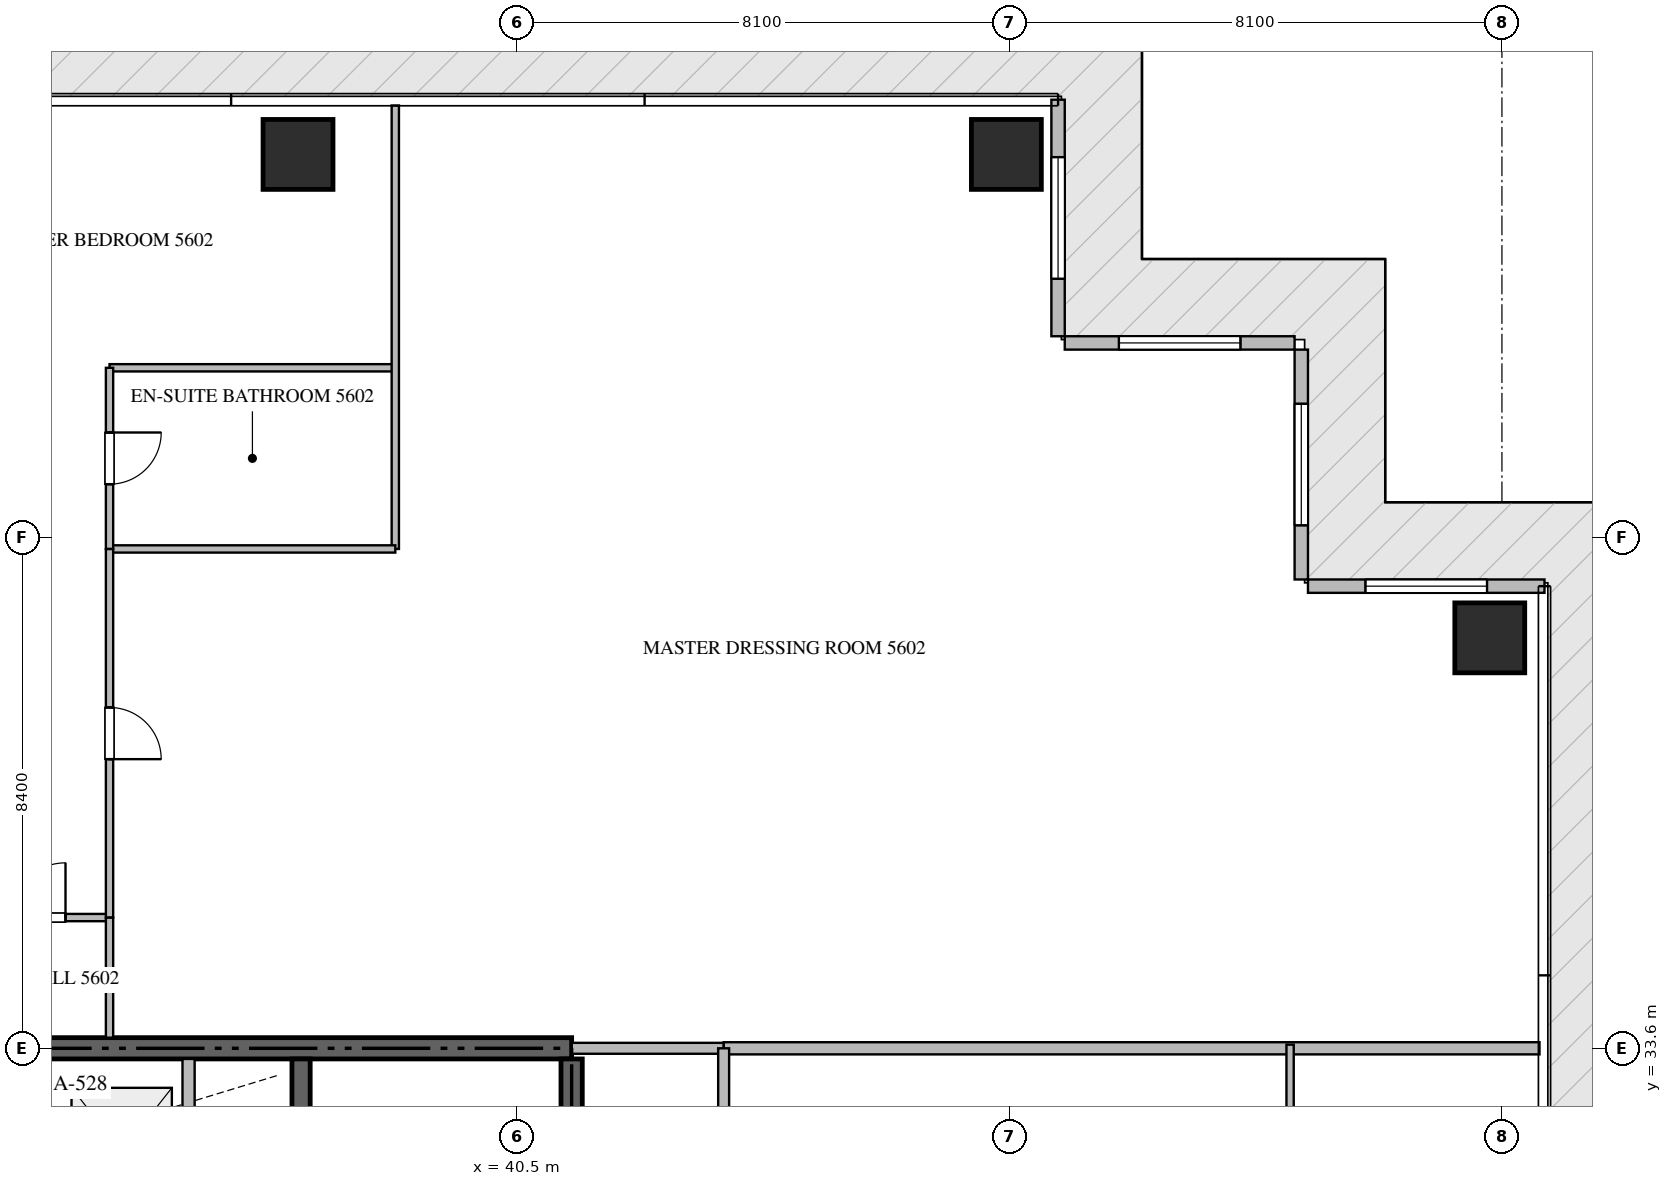
"""IFC4 building model, lengths in metres.
Left out: names, types, materials, properties, quantities, classifications, styles, units other than length and angle.
Written with IfcOpenShell. Run it as: python <this file> out.ifc"""

import sys

from ifc_helpers import new_model, si_unit, direction, frame, frame_2d, origin, origin_2d, place, context, subcontext, project, spatial, rectangle, extrude, source, transform, mapped, element, fill, save


model = new_model("IFC4")
c1 = context("Model", 3, precision=1e-05, world=origin(), true_north=direction((0.0, 1.0)))
c2 = subcontext(c1, "Body", "Model", "MODEL_VIEW")
j1 = project(units=[si_unit("LENGTHUNIT", "METRE"), si_unit("PLANEANGLEUNIT", "RADIAN")], contexts=[c1])
p1 = place(None, origin())
s1 = spatial("IfcSite", under=j1, at=p1, CompositionType="ELEMENT")
p2 = place(p1, origin())
s2 = spatial("IfcBuilding", under=s1, at=p2, CompositionType="ELEMENT")
p3 = place(p2, frame((0.0, 0.0, 225.85)))
s3 = spatial("IfcBuildingStorey", under=s2, at=p3, CompositionType="ELEMENT", Elevation=225.85)
p4 = place(p3, frame((41.4, 33.6, -0.26), z_axis=(0.0, 0.0, 1.0), x_axis=(-1.0, 0.0, 0.0)))
e1 = element("IfcWall", 1, at=p4, inside=s3, PredefinedType="SHEAR", context=c2, shape_type="SweptSolid", body=[
    extrude(rectangle(XDim=18.0, YDim=0.35, at=frame_2d((9.0, 0.0))), origin(), (0.0, 0.0, 1.0), 3.848),
])
p5 = place(p3, frame((41.4, 27.75, -0.26), z_axis=(0.0, 0.0, 1.0), x_axis=(0.0, 1.0, 0.0)))
e2 = element("IfcWall", 2, at=p5, inside=s3, PredefinedType="SHEAR", context=c2, shape_type="SweptSolid", body=[
    extrude(rectangle(XDim=5.675, YDim=0.35, at=frame_2d((2.837, 0.0))), origin(), (0.0, 0.0, 1.0), 3.848),
])
p6 = place(p3, frame((36.95, 27.05, -0.26), z_axis=(0.0, 0.0, 1.0), x_axis=(0.0, 1.0, 0.0)))
e3 = element("IfcWall", 3, at=p6, inside=s3, PredefinedType="SHEAR", context=c2, shape_type="SweptSolid", body=[
    extrude(rectangle(XDim=6.375, YDim=0.3, at=frame_2d((3.188, 0.0))), origin(), (0.0, 0.0, 1.0), 3.848),
])
m1 = source(origin(), c2, "Body", "SweptSolid", [
    extrude(rectangle(XDim=1.15, YDim=1.15, at=origin_2d()), origin(), (0.0, 0.0, 1.0), 3.85),
])
for number, where, z_axis, x_axis in (
    (4, (36.9, 48.3, -0.26), (0.0, 0.0, 1.0), (1.0, 0.0, 0.0)),
    (5, (48.55, 48.3, -0.26), (0.0, 0.0, 1.0), (1.0, 0.0, 0.0)),
    (6, (56.5, 40.35, -0.26), (0.0, 0.0, 1.0), (1.0, 0.0, 0.0)),
):
    element("IfcColumn", number, at=place(p3, frame(where, z_axis=z_axis, x_axis=x_axis)), inside=s3, PredefinedType="COLUMN", context=c2, shape_type="MappedRepresentation", body=[
        mapped(m1, transform((0.0, 0.0, 0.0), scale=1.0)),
    ])
p7 = place(p3, frame((57.4, 41.2, 0.0), z_axis=(0.0, 0.0, 1.0), x_axis=(-1.0, 0.0, 0.0)))
e7 = element("IfcWall", 7, at=p7, inside=s3, PredefinedType="ELEMENTEDWALL", context=c2, shape_type="SweptSolid", body=[
    extrude(rectangle(XDim=3.89, YDim=0.22, at=frame_2d((1.945, 0.0))), origin(), (0.0, 0.0, 1.0), 3.575),
])
p8 = place(p7, frame((0.945, 0.0, 0.65)))
e8 = element("IfcOpeningElement", 8, at=p8, cuts=e7, PredefinedType="OPENING", context=c2, shape_type="SweptSolid", body=[
    extrude(rectangle(XDim=2.0, YDim=2.2, at=frame_2d((1.0, 1.1))), frame((0.0, 0.12, 0.0), z_axis=(0.0, -1.0, 0.0), x_axis=(1.0, 0.0, 0.0)), (0.0, 0.0, 1.0), 0.24),
])
p9 = place(p3, frame((53.4, 41.31, 0.0), z_axis=(0.0, 0.0, 1.0), x_axis=(0.0, 1.0, 0.0)))
e9 = element("IfcWall", 9, at=p9, inside=s3, PredefinedType="ELEMENTEDWALL", context=c2, shape_type="SweptSolid", body=[
    extrude(rectangle(XDim=3.78, YDim=0.22, at=frame_2d((1.89, 0.0))), origin(), (0.0, 0.0, 1.0), 3.575),
])
p10 = place(p9, frame((0.89, 0.0, 0.65)))
e10 = element("IfcOpeningElement", 10, at=p10, cuts=e9, PredefinedType="OPENING", context=c2, shape_type="SweptSolid", body=[
    extrude(rectangle(XDim=2.0, YDim=2.2, at=frame_2d((1.0, 1.1))), frame((0.0, 0.12, 0.0), z_axis=(0.0, -1.0, 0.0), x_axis=(1.0, 0.0, 0.0)), (0.0, 0.0, 1.0), 0.24),
])
p11 = place(p3, frame((53.29, 45.2, 0.0), z_axis=(0.0, 0.0, 1.0), x_axis=(-1.0, 0.0, 0.0)))
e11 = element("IfcWall", 11, at=p11, inside=s3, PredefinedType="ELEMENTEDWALL", context=c2, shape_type="SweptSolid", body=[
    extrude(rectangle(XDim=3.78, YDim=0.22, at=frame_2d((1.89, 0.0))), origin(), (0.0, 0.0, 1.0), 3.575),
])
p12 = place(p11, frame((0.89, 0.0, 0.65)))
e12 = element("IfcOpeningElement", 12, at=p12, cuts=e11, PredefinedType="OPENING", context=c2, shape_type="SweptSolid", body=[
    extrude(rectangle(XDim=2.0, YDim=2.2, at=frame_2d((1.0, 1.1))), frame((0.0, 0.12, 0.0), z_axis=(0.0, -1.0, 0.0), x_axis=(1.0, 0.0, 0.0)), (0.0, 0.0, 1.0), 0.24),
])
p13 = place(p3, frame((49.4, 45.31, 0.0), z_axis=(0.0, 0.0, 1.0), x_axis=(0.0, 1.0, 0.0)))
e13 = element("IfcWall", 13, at=p13, inside=s3, PredefinedType="ELEMENTEDWALL", context=c2, shape_type="SweptSolid", body=[
    extrude(rectangle(XDim=3.89, YDim=0.22, at=frame_2d((1.945, 0.0))), origin(), (0.0, 0.0, 1.0), 3.575),
])
p14 = place(p13, frame((0.945, 0.0, 0.65)))
e14 = element("IfcOpeningElement", 14, at=p14, cuts=e13, PredefinedType="OPENING", context=c2, shape_type="SweptSolid", body=[
    extrude(rectangle(XDim=2.0, YDim=2.2, at=frame_2d((1.0, 1.1))), frame((0.0, 0.12, 0.0), z_axis=(0.0, -1.0, 0.0), x_axis=(1.0, 0.0, 0.0)), (0.0, 0.0, 1.0), 0.24),
])
p15 = place(p3, frame((35.1, 30.75, 0.0), z_axis=(0.0, 0.0, 1.0), x_axis=(0.0, 1.0, 0.0)))
e15 = element("IfcWall", 15, at=p15, inside=s3, PredefinedType="STANDARD", context=c2, shape_type="SweptSolid", body=[
    extrude(rectangle(XDim=2.675, YDim=0.2, at=frame_2d((1.337, 0.0))), origin(), (0.0, 0.0, 1.0), 3.59),
])
p16 = place(p3, frame((43.9, 33.6, 0.0), z_axis=(0.0, 0.0, 1.0), x_axis=(1.0, 0.0, 0.0)))
e16 = element("IfcWall", 16, at=p16, inside=s3, PredefinedType="PARTITIONING", context=c2, shape_type="SweptSolid", body=[
    extrude(rectangle(XDim=13.418, YDim=0.2, at=frame_2d((6.709, 0.0))), origin(), (0.0, 0.0, 1.0), 3.59),
])
p17 = place(p3, frame((41.402, 33.6, 0.0), z_axis=(0.0, 0.0, 1.0), x_axis=(1.0, 0.0, 0.0)))
e17 = element("IfcWall", 17, at=p17, inside=s3, PredefinedType="PARTITIONING", context=c2, shape_type="SweptSolid", body=[
    extrude(rectangle(XDim=2.496, YDim=0.18, at=frame_2d((1.248, 0.0))), origin(), (0.0, 0.0, 1.0), 3.59),
])
p18 = place(p3, frame((43.9, 16.8, 0.0), z_axis=(0.0, 0.0, 1.0), x_axis=(0.0, 1.0, 0.0)))
e18 = element("IfcWall", 18, at=p18, inside=s3, PredefinedType="PARTITIONING", context=c2, shape_type="SweptSolid", body=[
    extrude(rectangle(XDim=16.8, YDim=0.18, at=frame_2d((8.4, 0.0))), origin(), (0.0, 0.0, 1.0), 3.59),
])
p19 = place(p18, frame((1.3, 0.0, 0.0)))
e19 = element("IfcOpeningElement", 19, at=p19, cuts=e18, PredefinedType="OPENING", context=c2, shape_type="SweptSolid", body=[
    extrude(rectangle(XDim=1.0, YDim=2.15, at=frame_2d((0.5, 1.075))), frame((0.0, 0.1, 0.0), z_axis=(0.0, -1.0, 0.0), x_axis=(1.0, 0.0, 0.0)), (0.0, 0.0, 1.0), 0.2),
])
p20 = place(p3, frame((31.452, 35.75, 0.0), z_axis=(0.0, 0.0, 1.0), x_axis=(1.0, 0.0, 0.0)))
e20 = element("IfcWall", 20, at=p20, inside=s3, PredefinedType="PARTITIONING", context=c2, shape_type="SweptSolid", body=[
    extrude(rectangle(XDim=2.348, YDim=0.12, at=frame_2d((1.174, 0.0))), origin(), (0.0, 0.0, 1.0), 3.59),
])
p21 = place(p20, frame((0.724, 0.0, 0.0)))
e21 = element("IfcOpeningElement", 21, at=p21, cuts=e20, PredefinedType="OPENING", context=c2, shape_type="SweptSolid", body=[
    extrude(rectangle(XDim=0.9, YDim=2.1, at=frame_2d((0.45, 1.05))), frame((0.0, 0.07, 0.0), z_axis=(0.0, -1.0, 0.0), x_axis=(1.0, 0.0, 0.0)), (0.0, 0.0, 1.0), 0.14),
])
p22 = place(p3, frame((33.8, 44.791, 0.0), z_axis=(0.0, 0.0, 1.0), x_axis=(1.0, 0.0, 0.0)))
e22 = element("IfcWall", 22, at=p22, inside=s3, PredefinedType="PARTITIONING", context=c2, shape_type="SweptSolid", body=[
    extrude(rectangle(XDim=4.7, YDim=0.12, at=frame_2d((2.35, 0.0))), origin(), (0.0, 0.0, 1.0), 3.59),
])
p23 = place(p3, frame((38.5, 49.105, 0.0), z_axis=(0.0, 0.0, 1.0), x_axis=(0.0, -1.0, 0.0)))
e23 = element("IfcWall", 23, at=p23, inside=s3, PredefinedType="PARTITIONING", context=c2, shape_type="SweptSolid", body=[
    extrude(rectangle(XDim=7.293, YDim=0.12, at=frame_2d((3.646, 0.0))), origin(), (0.0, 0.0, 1.0), 3.59),
])
p24 = place(p3, frame((33.8, 41.812, 0.0), z_axis=(0.0, 0.0, 1.0), x_axis=(1.0, 0.0, 0.0)))
e24 = element("IfcWall", 24, at=p24, inside=s3, PredefinedType="PARTITIONING", context=c2, shape_type="SweptSolid", body=[
    extrude(rectangle(XDim=4.7, YDim=0.12, at=frame_2d((2.35, 0.0))), origin(), (0.0, 0.0, 1.0), 3.59),
])
p25 = place(p3, frame((33.8, 44.791, 0.0), z_axis=(0.0, 0.0, 1.0), x_axis=(0.0, -1.0, 0.0)))
e25 = element("IfcWall", 25, at=p25, inside=s3, PredefinedType="PARTITIONING", context=c2, shape_type="SweptSolid", body=[
    extrude(rectangle(XDim=2.979, YDim=0.12, at=frame_2d((1.49, 0.0))), origin(), (0.0, 0.0, 1.0), 3.59),
])
p26 = place(p25, frame((1.064, 0.0, 0.0)))
e26 = element("IfcOpeningElement", 26, at=p26, cuts=e25, PredefinedType="OPENING", context=c2, shape_type="SweptSolid", body=[
    extrude(rectangle(XDim=0.85, YDim=2.1, at=frame_2d((0.425, 1.05))), frame((0.0, 0.07, 0.0), z_axis=(0.0, -1.0, 0.0), x_axis=(1.0, 0.0, 0.0)), (0.0, 0.0, 1.0), 0.14),
])
p27 = place(p3, frame((33.8, 41.81, 0.0), z_axis=(0.0, 0.0, 1.0), x_axis=(0.0, -1.0, 0.0)))
e27 = element("IfcWall", 27, at=p27, inside=s3, PredefinedType="PARTITIONING", context=c2, shape_type="SweptSolid", body=[
    extrude(rectangle(XDim=6.06, YDim=0.12, at=frame_2d((3.03, 0.0))), origin(), (0.0, 0.0, 1.0), 3.59),
])
p28 = place(p27, frame((2.605, 0.0, 0.0)))
e28 = element("IfcOpeningElement", 28, at=p28, cuts=e27, PredefinedType="OPENING", context=c2, shape_type="SweptSolid", body=[
    extrude(rectangle(XDim=0.85, YDim=2.1, at=frame_2d((0.425, 1.05))), frame((0.0, 0.07, 0.0), z_axis=(0.0, -1.0, 0.0), x_axis=(1.0, 0.0, 0.0)), (0.0, 0.0, 1.0), 0.14),
])
p29 = place(p3, frame((33.8, 35.748, 0.0), z_axis=(0.0, 0.0, 1.0), x_axis=(0.0, -1.0, 0.0)))
e29 = element("IfcWall", 29, at=p29, inside=s3, PredefinedType="PARTITIONING", context=c2, shape_type="SweptSolid", body=[
    extrude(rectangle(XDim=1.973, YDim=0.12, at=frame_2d((0.987, 0.0))), origin(), (0.0, 0.0, 1.0), 3.59),
])
p30 = place(p3, frame((53.216, 23.18, 0.0), z_axis=(0.0, 0.0, 1.0), x_axis=(0.0, 1.0, 0.0)))
e30 = element("IfcWall", 30, at=p30, inside=s3, PredefinedType="PARTITIONING", context=c2, shape_type="SweptSolid", body=[
    extrude(rectangle(XDim=10.48, YDim=0.12, at=frame_2d((5.24, 0.0))), origin(), (0.0, 0.0, 1.0), 3.59),
])
m2 = source(origin(), c2, "Body", "SweptSolid", [
    extrude(rectangle(XDim=2.0, YDim=2.2, at=frame_2d((1.0, 1.1))), frame((0.0, 0.03, 0.0), z_axis=(0.0, -1.0, 0.0), x_axis=(1.0, 0.0, 0.0)), (0.0, 0.0, 1.0), 0.06),
])
p31 = place(p8, origin())
e31 = element("IfcWindow", 31, at=p31, inside=s3, PartitioningType="SINGLE_PANEL", PredefinedType="WINDOW", context=c2, shape_type="MappedRepresentation", body=[
    mapped(m2, transform((0.0, 0.0, 0.0), scale=1.0)),
])
fill(e8, e31)
p32 = place(p10, origin())
e32 = element("IfcWindow", 32, at=p32, inside=s3, PartitioningType="SINGLE_PANEL", PredefinedType="WINDOW", context=c2, shape_type="MappedRepresentation", body=[
    mapped(m2, transform((0.0, 0.0, 0.0), scale=1.0)),
])
fill(e10, e32)
p33 = place(p12, origin())
e33 = element("IfcWindow", 33, at=p33, inside=s3, PartitioningType="SINGLE_PANEL", PredefinedType="WINDOW", context=c2, shape_type="MappedRepresentation", body=[
    mapped(m2, transform((0.0, 0.0, 0.0), scale=1.0)),
])
fill(e12, e33)
p34 = place(p14, origin())
e34 = element("IfcWindow", 34, at=p34, inside=s3, PartitioningType="SINGLE_PANEL", PredefinedType="WINDOW", context=c2, shape_type="MappedRepresentation", body=[
    mapped(m2, transform((0.0, 0.0, 0.0), scale=1.0)),
])
fill(e14, e34)
m3 = source(origin(), c2, "Body", "SweptSolid", [
    extrude(rectangle(XDim=0.9, YDim=2.1, at=frame_2d((0.45, 1.05))), frame((0.0, 0.025, 0.0), z_axis=(0.0, -1.0, 0.0), x_axis=(1.0, 0.0, 0.0)), (0.0, 0.0, 1.0), 0.05),
])
p35 = place(p21, origin())
e35 = element("IfcDoor", 35, at=p35, inside=s3, OperationType="SINGLE_SWING_RIGHT", PredefinedType="DOOR", context=c2, shape_type="MappedRepresentation", body=[
    mapped(m3, transform((0.0, 0.0, 0.0), scale=1.0)),
])
fill(e21, e35)
m4 = source(origin(), c2, "Body", "SweptSolid", [
    extrude(rectangle(XDim=0.85, YDim=2.1, at=frame_2d((0.425, 1.05))), frame((0.0, 0.025, 0.0), z_axis=(0.0, -1.0, 0.0), x_axis=(1.0, 0.0, 0.0)), (0.0, 0.0, 1.0), 0.05),
])
p36 = place(p26, origin())
e36 = element("IfcDoor", 36, at=p36, inside=s3, OperationType="SINGLE_SWING_LEFT", PredefinedType="DOOR", context=c2, shape_type="MappedRepresentation", body=[
    mapped(m4, transform((0.0, 0.0, 0.0), scale=1.0)),
])
fill(e26, e36)
p37 = place(p28, origin())
e37 = element("IfcDoor", 37, at=p37, inside=s3, OperationType="SINGLE_SWING_RIGHT", PredefinedType="DOOR", context=c2, shape_type="MappedRepresentation", body=[
    mapped(m4, transform((0.0, 0.0, 0.0), scale=1.0)),
])
fill(e28, e37)
save(model, sys.argv[1])
